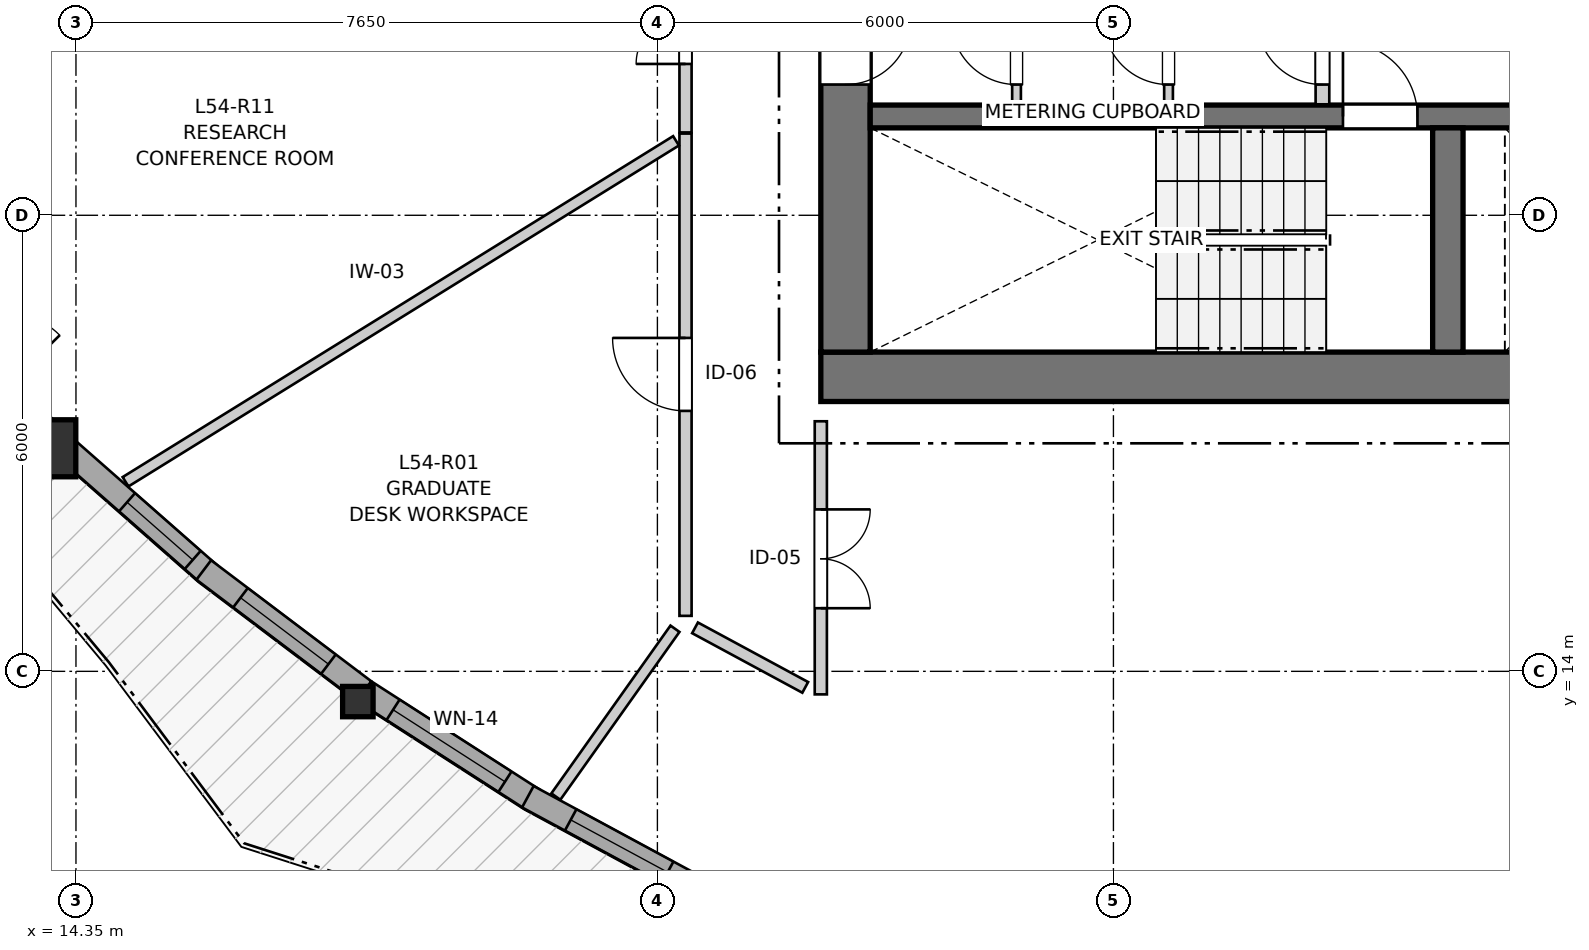
"""IFC4 building model, lengths in metres.
Left out: names, types, materials, properties, quantities, classifications, styles, units other than length and angle.
Written with IfcOpenShell. Run it as: python <this file> out.ifc"""

import sys

from ifc_helpers import new_model, si_unit, direction, frame, frame_2d, origin, origin_2d, place, context, subcontext, project, spatial, rectangle, i_section, extrude, source, transform, mapped, element, fill, save


model = new_model("IFC4")
c1 = context("Model", 3, precision=1e-05, world=origin(), true_north=direction((0.0, 1.0)))
c2 = subcontext(c1, "Body", "Model", "MODEL_VIEW")
j1 = project(units=[si_unit("LENGTHUNIT", "METRE"), si_unit("PLANEANGLEUNIT", "RADIAN")], contexts=[c1])
p1 = place(None, origin())
s1 = spatial("IfcSite", under=j1, at=p1, CompositionType="ELEMENT")
p2 = place(p1, origin())
s2 = spatial("IfcBuilding", under=s1, at=p2, CompositionType="ELEMENT")
p3 = place(p2, frame((0.0, 0.0, 181.0)))
s3 = spatial("IfcBuildingStorey", under=s2, at=p3, CompositionType="ELEMENT", Elevation=181.0)
p4 = place(p3, frame((24.15, 17.875, 0.0), z_axis=(0.0, 0.0, 1.0), x_axis=(1.0, 0.0, 0.0)))
e1 = element("IfcWall", 1, at=p4, inside=s3, PredefinedType="SHEAR", context=c2, shape_type="SweptSolid", body=[
    extrude(rectangle(XDim=12.4, YDim=0.65, at=frame_2d((6.2, 0.0))), origin(), (0.0, 0.0, 1.0), 2.95),
])
p5 = place(p3, frame((24.475, 33.8, 0.0), z_axis=(0.0, 0.0, 1.0), x_axis=(0.0, -1.0, 0.0)))
e2 = element("IfcWall", 2, at=p5, inside=s3, PredefinedType="SHEAR", context=c2, shape_type="SweptSolid", body=[
    extrude(rectangle(XDim=15.6, YDim=0.65, at=frame_2d((7.8, 0.0))), origin(), (0.0, 0.0, 1.0), 2.95),
])
p6 = place(p5, frame((7.05, 0.0, 0.0)))
e3 = element("IfcOpeningElement", 3, at=p6, cuts=e2, PredefinedType="OPENING", context=c2, shape_type="SweptSolid", body=[
    extrude(rectangle(XDim=1.5, YDim=2.15, at=frame_2d((0.75, 1.075))), frame((0.0, 0.335, 0.0), z_axis=(0.0, -1.0, 0.0), x_axis=(1.0, 0.0, 0.0)), (0.0, 0.0, 1.0), 0.67),
])
p7 = place(p5, frame((3.52, 0.0, 0.0)))
e4 = element("IfcOpeningElement", 4, at=p7, cuts=e2, PredefinedType="OPENING", context=c2, shape_type="SweptSolid", body=[
    extrude(rectangle(XDim=0.86, YDim=2.05, at=frame_2d((0.43, 1.025))), frame((0.0, 0.335, 0.0), z_axis=(0.0, -1.0, 0.0), x_axis=(1.0, 0.0, 0.0)), (0.0, 0.0, 1.0), 0.67),
])
p8 = place(p5, frame((11.22, 0.0, 0.0)))
e5 = element("IfcOpeningElement", 5, at=p8, cuts=e2, PredefinedType="OPENING", context=c2, shape_type="SweptSolid", body=[
    extrude(rectangle(XDim=0.86, YDim=2.05, at=frame_2d((0.43, 1.025))), frame((0.0, 0.335, 0.0), z_axis=(0.0, -1.0, 0.0), x_axis=(1.0, 0.0, 0.0)), (0.0, 0.0, 1.0), 0.67),
])
p9 = place(p3, frame((24.8, 21.3, 0.0), z_axis=(0.0, 0.0, 1.0), x_axis=(1.0, 0.0, 0.0)))
e6 = element("IfcWall", 6, at=p9, inside=s3, PredefinedType="SHEAR", context=c2, shape_type="SweptSolid", body=[
    extrude(rectangle(XDim=11.1, YDim=0.3, at=frame_2d((5.55, 0.0))), origin(), (0.0, 0.0, 1.0), 2.95),
])
p10 = place(p9, frame((6.22, 0.0, 0.0)))
e7 = element("IfcOpeningElement", 7, at=p10, cuts=e6, PredefinedType="OPENING", context=c2, shape_type="SweptSolid", body=[
    extrude(rectangle(XDim=0.98, YDim=2.15, at=frame_2d((0.49, 1.075))), frame((0.0, 0.16, 0.0), z_axis=(0.0, -1.0, 0.0), x_axis=(1.0, 0.0, 0.0)), (0.0, 0.0, 1.0), 0.32),
])
p11 = place(p9, frame((9.15, 0.0, 0.0)))
e8 = element("IfcOpeningElement", 8, at=p11, cuts=e6, PredefinedType="OPENING", context=c2, shape_type="SweptSolid", body=[
    extrude(rectangle(XDim=1.15, YDim=2.15, at=frame_2d((0.575, 1.075))), frame((0.0, 0.16, 0.0), z_axis=(0.0, -1.0, 0.0), x_axis=(1.0, 0.0, 0.0)), (0.0, 0.0, 1.0), 0.32),
])
p12 = place(p3, frame((32.4, 18.2, 0.0), z_axis=(0.0, 0.0, 1.0), x_axis=(0.0, 1.0, 0.0)))
e9 = element("IfcWall", 9, at=p12, inside=s3, PredefinedType="SHEAR", context=c2, shape_type="SweptSolid", body=[
    extrude(rectangle(XDim=2.95, YDim=0.4, at=frame_2d((1.475, 0.0))), origin(), (0.0, 0.0, 1.0), 2.95),
])
m1 = source(origin(), c2, "Body", "SweptSolid", [
    extrude(rectangle(XDim=0.75, YDim=0.75, at=origin_2d()), origin(), (0.0, 0.0, 1.0), 2.95),
])
p13 = place(p3, frame((13.973, 16.935, 0.0), z_axis=(0.0, 0.0, 1.0), x_axis=(1.0, 0.0, 0.0)))
e10 = element("IfcColumn", 10, at=p13, inside=s3, PredefinedType="COLUMN", context=c2, shape_type="MappedRepresentation", body=[
    mapped(m1, transform((0.0, 0.0, 0.0), x_axis=(1.0, 0.0, 0.0), y_axis=(0.0, 1.0, 0.0), z_axis=(0.0, 0.0, 1.0), scale=1.0)),
])
m2 = source(origin(), c2, "Body", "SweptSolid", [
    extrude(i_section(OverallWidth=0.401, OverallDepth=0.399, WebThickness=0.023, FlangeThickness=0.036, FilletRadius=0.015, at=origin_2d()), origin(), (0.0, 0.0, 1.0), 2.95),
])
p14 = place(p3, frame((18.059, 13.602, 0.0), z_axis=(0.0, 0.0, 1.0), x_axis=(1.0, 0.0, 0.0)))
e11 = element("IfcColumn", 11, at=p14, inside=s3, PredefinedType="PILASTER", context=c2, shape_type="MappedRepresentation", body=[
    mapped(m2, transform((0.0, 0.0, 0.0), x_axis=(1.0, 0.0, 0.0), y_axis=(0.0, 1.0, 0.0), z_axis=(0.0, 0.0, 1.0), scale=1.0)),
])
p15 = place(p3, frame((12.168, 18.996, 0.0), z_axis=(0.0, 0.0, 1.0), x_axis=(0.701479569818, -0.712689562943, 0.0)))
e12 = element("IfcWall", 12, at=p15, inside=s3, PredefinedType="SOLIDWALL", context=c2, shape_type="SweptSolid", body=[
    extrude(rectangle(XDim=2.57, YDim=0.32, at=frame_2d((1.285, 0.0))), origin(), (0.0, 0.0, 1.0), 2.53),
])
p16 = place(p15, frame((0.79, 0.0, 0.0)))
e13 = element("IfcOpeningElement", 13, at=p16, cuts=e12, PredefinedType="OPENING", context=c2, shape_type="SweptSolid", body=[
    extrude(rectangle(XDim=1.0, YDim=2.1, at=frame_2d((0.5, 1.05))), frame((0.0, 0.17, 0.0), z_axis=(0.0, -1.0, 0.0), x_axis=(1.0, 0.0, 0.0)), (0.0, 0.0, 1.0), 0.34),
])
p17 = place(p3, frame((14.202, 16.946, 0.0), z_axis=(0.0, 0.0, 1.0), x_axis=(0.751119873672, -0.660165839297, 0.0)))
e14 = element("IfcWall", 14, at=p17, inside=s3, PredefinedType="SOLIDWALL", context=c2, shape_type="SweptSolid", body=[
    extrude(rectangle(XDim=2.526, YDim=0.32, at=frame_2d((1.263, 0.0))), origin(), (0.0, 0.0, 1.0), 2.53),
])
p18 = place(p17, frame((1.092, 0.0, 0.82)))
e15 = element("IfcOpeningElement", 15, at=p18, cuts=e14, PredefinedType="OPENING", context=c2, shape_type="SweptSolid", body=[
    extrude(rectangle(XDim=1.15, YDim=1.2, at=frame_2d((0.575, 0.6))), frame((0.0, 0.17, 0.0), z_axis=(0.0, -1.0, 0.0), x_axis=(1.0, 0.0, 0.0)), (0.0, 0.0, 1.0), 0.34),
])
p19 = place(p3, frame((16.031, 15.334, 0.0), z_axis=(0.0, 0.0, 1.0), x_axis=(0.797976962718, -0.602687951573, 0.0)))
e16 = element("IfcWall", 16, at=p19, inside=s3, PredefinedType="SOLIDWALL", context=c2, shape_type="SweptSolid", body=[
    extrude(rectangle(XDim=2.642, YDim=0.32, at=frame_2d((1.321, 0.0))), origin(), (0.0, 0.0, 1.0), 2.53),
])
p20 = place(p19, frame((0.606, 0.0, 0.82)))
e17 = element("IfcOpeningElement", 17, at=p20, cuts=e16, PredefinedType="OPENING", context=c2, shape_type="SweptSolid", body=[
    extrude(rectangle(XDim=1.45, YDim=1.25, at=frame_2d((0.725, 0.625))), frame((0.0, 0.17, 0.0), z_axis=(0.0, -1.0, 0.0), x_axis=(1.0, 0.0, 0.0)), (0.0, 0.0, 1.0), 0.34),
])
p21 = place(p3, frame((18.162, 13.726, 0.0), z_axis=(0.0, 0.0, 1.0), x_axis=(0.841187536261, -0.540743496345, 0.0)))
e18 = element("IfcWall", 18, at=p21, inside=s3, PredefinedType="SOLIDWALL", context=c2, shape_type="SweptSolid", body=[
    extrude(rectangle(XDim=2.626, YDim=0.32, at=frame_2d((1.313, 0.0))), origin(), (0.0, 0.0, 1.0), 2.53),
])
p22 = place(p21, frame((0.428, 0.0, 0.82)))
e19 = element("IfcOpeningElement", 19, at=p22, cuts=e18, PredefinedType="OPENING", context=c2, shape_type="SweptSolid", body=[
    extrude(rectangle(XDim=1.75, YDim=1.3, at=frame_2d((0.875, 0.65))), frame((0.0, 0.17, 0.0), z_axis=(0.0, -1.0, 0.0), x_axis=(1.0, 0.0, 0.0)), (0.0, 0.0, 1.0), 0.34),
])
p23 = place(p3, frame((20.295, 12.351, 0.0), z_axis=(0.0, 0.0, 1.0), x_axis=(0.879809944858, -0.475325636726, 0.0)))
e20 = element("IfcWall", 20, at=p23, inside=s3, PredefinedType="SOLIDWALL", context=c2, shape_type="SweptSolid", body=[
    extrude(rectangle(XDim=2.481, YDim=0.32, at=frame_2d((1.241, 0.0))), origin(), (0.0, 0.0, 1.0), 2.53),
])
p24 = place(p23, frame((0.641, 0.0, 0.82)))
e21 = element("IfcOpeningElement", 21, at=p24, cuts=e20, PredefinedType="OPENING", context=c2, shape_type="SweptSolid", body=[
    extrude(rectangle(XDim=1.45, YDim=1.25, at=frame_2d((0.725, 0.625))), frame((0.0, 0.17, 0.0), z_axis=(0.0, -1.0, 0.0), x_axis=(1.0, 0.0, 0.0)), (0.0, 0.0, 1.0), 0.34),
])
p25 = place(p3, frame((30.75, 21.46, 0.0), z_axis=(0.0, 0.0, 1.0), x_axis=(0.0, 1.0, 0.0)))
e22 = element("IfcWall", 22, at=p25, inside=s3, PredefinedType="PARTITIONING", context=c2, shape_type="SweptSolid", body=[
    extrude(rectangle(XDim=3.11, YDim=0.18, at=frame_2d((1.555, 0.0))), origin(), (0.0, 0.0, 1.0), 2.95),
])
p26 = place(p25, frame((0.26, 0.0, 0.0)))
e23 = element("IfcOpeningElement", 23, at=p26, cuts=e22, PredefinedType="OPENING", context=c2, shape_type="SweptSolid", body=[
    extrude(rectangle(XDim=0.86, YDim=2.05, at=frame_2d((0.43, 1.025))), frame((0.0, 0.1, 0.0), z_axis=(0.0, -1.0, 0.0), x_axis=(1.0, 0.0, 0.0)), (0.0, 0.0, 1.0), 0.2),
])
p27 = place(p3, frame((26.725, 21.46, 0.0), z_axis=(0.0, 0.0, 1.0), x_axis=(0.0, 1.0, 0.0)))
e24 = element("IfcWall", 24, at=p27, inside=s3, PredefinedType="PARTITIONING", context=c2, shape_type="SweptSolid", body=[
    extrude(rectangle(XDim=1.38, YDim=0.115, at=frame_2d((0.69, 0.0))), origin(), (0.0, 0.0, 1.0), 2.95),
])
p28 = place(p27, frame((0.26, 0.0, 0.0)))
e25 = element("IfcOpeningElement", 25, at=p28, cuts=e24, PredefinedType="OPENING", context=c2, shape_type="SweptSolid", body=[
    extrude(rectangle(XDim=0.86, YDim=2.05, at=frame_2d((0.43, 1.025))), frame((0.0, 0.067, 0.0), z_axis=(0.0, -1.0, 0.0), x_axis=(1.0, 0.0, 0.0)), (0.0, 0.0, 1.0), 0.135),
])
p29 = place(p3, frame((28.725, 21.46, 0.0), z_axis=(0.0, 0.0, 1.0), x_axis=(0.0, 1.0, 0.0)))
e26 = element("IfcWall", 26, at=p29, inside=s3, PredefinedType="PARTITIONING", context=c2, shape_type="SweptSolid", body=[
    extrude(rectangle(XDim=1.38, YDim=0.115, at=frame_2d((0.69, 0.0))), origin(), (0.0, 0.0, 1.0), 2.95),
])
p30 = place(p29, frame((0.26, 0.0, 0.0)))
e27 = element("IfcOpeningElement", 27, at=p30, cuts=e26, PredefinedType="OPENING", context=c2, shape_type="SweptSolid", body=[
    extrude(rectangle(XDim=0.86, YDim=2.05, at=frame_2d((0.43, 1.025))), frame((0.0, 0.067, 0.0), z_axis=(0.0, -1.0, 0.0), x_axis=(1.0, 0.0, 0.0)), (0.0, 0.0, 1.0), 0.135),
])
p31 = place(p3, frame((22.37, 14.73, 0.0), z_axis=(0.0, 0.0, 1.0), x_axis=(0.0, 1.0, 0.0)))
e28 = element("IfcWall", 28, at=p31, inside=s3, PredefinedType="PARTITIONING", context=c2, shape_type="SweptSolid", body=[
    extrude(rectangle(XDim=6.345, YDim=0.16, at=frame_2d((3.172, 0.0))), origin(), (0.0, 0.0, 1.0), 2.95),
])
p32 = place(p31, frame((2.697, 0.0, 0.0)))
e29 = element("IfcOpeningElement", 29, at=p32, cuts=e28, PredefinedType="OPENING", context=c2, shape_type="SweptSolid", body=[
    extrude(rectangle(XDim=0.96, YDim=2.1, at=frame_2d((0.48, 1.05))), frame((0.0, 0.09, 0.0), z_axis=(0.0, -1.0, 0.0), x_axis=(1.0, 0.0, 0.0)), (0.0, 0.0, 1.0), 0.18),
])
p33 = place(p3, frame((24.15, 17.29, 0.0), z_axis=(0.0, 0.0, 1.0), x_axis=(0.0, -1.0, 0.0)))
e30 = element("IfcWall", 30, at=p33, inside=s3, PredefinedType="PARTITIONING", context=c2, shape_type="SweptSolid", body=[
    extrude(rectangle(XDim=3.593, YDim=0.16, at=frame_2d((1.796, 0.0))), origin(), (0.0, 0.0, 1.0), 2.95),
])
p34 = place(p33, frame((1.159, 0.0, 0.0)))
e31 = element("IfcOpeningElement", 31, at=p34, cuts=e30, PredefinedType="OPENING", context=c2, shape_type="SweptSolid", body=[
    extrude(rectangle(XDim=1.3, YDim=2.1, at=frame_2d((0.65, 1.05))), frame((0.0, 0.09, 0.0), z_axis=(0.0, -1.0, 0.0), x_axis=(1.0, 0.0, 0.0)), (0.0, 0.0, 1.0), 0.18),
])
p35 = place(p3, frame((22.37, 21.09, 0.0), z_axis=(0.0, 0.0, 1.0), x_axis=(0.0, 1.0, 0.0)))
e32 = element("IfcWall", 32, at=p35, inside=s3, PredefinedType="PARTITIONING", context=c2, shape_type="SweptSolid", body=[
    extrude(rectangle(XDim=3.06, YDim=0.16, at=frame_2d((1.53, 0.0))), origin(), (0.0, 0.0, 1.0), 2.95),
])
p36 = place(p35, frame((0.901, 0.0, 0.0)))
e33 = element("IfcOpeningElement", 33, at=p36, cuts=e32, PredefinedType="OPENING", context=c2, shape_type="SweptSolid", body=[
    extrude(rectangle(XDim=1.3, YDim=2.1, at=frame_2d((0.65, 1.05))), frame((0.0, 0.09, 0.0), z_axis=(0.0, -1.0, 0.0), x_axis=(1.0, 0.0, 0.0)), (0.0, 0.0, 1.0), 0.18),
])
p37 = place(p3, frame((15.002, 16.494, 0.0), z_axis=(0.0, 0.0, 1.0), x_axis=(0.850179022177, 0.5264937134, 0.0)))
e34 = element("IfcWall", 34, at=p37, inside=s3, PredefinedType="PARTITIONING", context=c2, shape_type="SweptSolid", body=[
    extrude(rectangle(XDim=8.519, YDim=0.145, at=frame_2d((4.26, 0.0))), origin(), (0.0, 0.0, 1.0), 2.95),
])
p38 = place(p3, frame((20.664, 12.352, 0.0), z_axis=(0.0, 0.0, 1.0), x_axis=(0.578847584957, 0.815435756752, 0.0)))
e35 = element("IfcWall", 35, at=p38, inside=s3, PredefinedType="PARTITIONING", context=c2, shape_type="SweptSolid", body=[
    extrude(rectangle(XDim=2.708, YDim=0.145, at=frame_2d((1.354, 0.0))), origin(), (0.0, 0.0, 1.0), 2.95),
])
p39 = place(p3, frame((22.495, 14.573, 0.0), z_axis=(0.0, 0.0, 1.0), x_axis=(0.879785217584, -0.475371403137, 0.0)))
e36 = element("IfcWall", 36, at=p39, inside=s3, PredefinedType="PARTITIONING", context=c2, shape_type="SweptSolid", body=[
    extrude(rectangle(XDim=1.648, YDim=0.16, at=frame_2d((0.824, 0.0))), origin(), (0.0, 0.0, 1.0), 2.95),
])
m3 = source(origin(), c2, "Body", "SweptSolid", [
    extrude(rectangle(XDim=1.15, YDim=1.2, at=frame_2d((0.575, 0.6))), frame((0.0, 0.03, 0.0), z_axis=(0.0, -1.0, 0.0), x_axis=(1.0, 0.0, 0.0)), (0.0, 0.0, 1.0), 0.06),
])
p40 = place(p18, origin())
e37 = element("IfcWindow", 37, at=p40, inside=s3, PartitioningType="SINGLE_PANEL", PredefinedType="WINDOW", context=c2, shape_type="MappedRepresentation", body=[
    mapped(m3, transform((0.0, 0.0, 0.0), x_axis=(1.0, 0.0, 0.0), y_axis=(0.0, 1.0, 0.0), z_axis=(0.0, 0.0, 1.0), scale=1.0)),
])
fill(e15, e37)
m4 = source(origin(), c2, "Body", "SweptSolid", [
    extrude(rectangle(XDim=1.45, YDim=1.25, at=frame_2d((0.725, 0.625))), frame((0.0, 0.03, 0.0), z_axis=(0.0, -1.0, 0.0), x_axis=(1.0, 0.0, 0.0)), (0.0, 0.0, 1.0), 0.06),
])
p41 = place(p20, origin())
e38 = element("IfcWindow", 38, at=p41, inside=s3, PartitioningType="SINGLE_PANEL", PredefinedType="WINDOW", context=c2, shape_type="MappedRepresentation", body=[
    mapped(m4, transform((0.0, 0.0, 0.0), x_axis=(1.0, 0.0, 0.0), y_axis=(0.0, 1.0, 0.0), z_axis=(0.0, 0.0, 1.0), scale=1.0)),
])
fill(e17, e38)
m5 = source(origin(), c2, "Body", "SweptSolid", [
    extrude(rectangle(XDim=1.75, YDim=1.3, at=frame_2d((0.875, 0.65))), frame((0.0, 0.03, 0.0), z_axis=(0.0, -1.0, 0.0), x_axis=(1.0, 0.0, 0.0)), (0.0, 0.0, 1.0), 0.06),
])
p42 = place(p22, origin())
e39 = element("IfcWindow", 39, at=p42, inside=s3, PartitioningType="SINGLE_PANEL", PredefinedType="WINDOW", context=c2, shape_type="MappedRepresentation", body=[
    mapped(m5, transform((0.0, 0.0, 0.0), x_axis=(1.0, 0.0, 0.0), y_axis=(0.0, 1.0, 0.0), z_axis=(0.0, 0.0, 1.0), scale=1.0)),
])
fill(e19, e39)
p43 = place(p24, origin())
e40 = element("IfcWindow", 40, at=p43, inside=s3, PartitioningType="SINGLE_PANEL", PredefinedType="WINDOW", context=c2, shape_type="MappedRepresentation", body=[
    mapped(m4, transform((0.0, 0.0, 0.0), x_axis=(1.0, 0.0, 0.0), y_axis=(0.0, 1.0, 0.0), z_axis=(0.0, 0.0, 1.0), scale=1.0)),
])
fill(e21, e40)
m6 = source(origin(), c2, "Body", "SweptSolid", [
    extrude(rectangle(XDim=0.98, YDim=2.15, at=frame_2d((0.49, 1.075))), frame((0.0, 0.025, 0.0), z_axis=(0.0, -1.0, 0.0), x_axis=(1.0, 0.0, 0.0)), (0.0, 0.0, 1.0), 0.05),
])
p44 = place(p10, origin())
e41 = element("IfcDoor", 41, at=p44, inside=s3, OperationType="SINGLE_SWING_LEFT", PredefinedType="DOOR", context=c2, shape_type="MappedRepresentation", body=[
    mapped(m6, transform((0.0, 0.0, 0.0), x_axis=(1.0, 0.0, 0.0), y_axis=(0.0, 1.0, 0.0), z_axis=(0.0, 0.0, 1.0), scale=1.0)),
])
fill(e7, e41)
m7 = source(origin(), c2, "Body", "SweptSolid", [
    extrude(rectangle(XDim=0.86, YDim=2.05, at=frame_2d((0.43, 1.025))), frame((0.0, 0.025, 0.0), z_axis=(0.0, -1.0, 0.0), x_axis=(1.0, 0.0, 0.0)), (0.0, 0.0, 1.0), 0.05),
])
p45 = place(p8, origin())
e42 = element("IfcDoor", 42, at=p45, inside=s3, OperationType="SINGLE_SWING_LEFT", PredefinedType="DOOR", context=c2, shape_type="MappedRepresentation", body=[
    mapped(m7, transform((0.0, 0.0, 0.0), x_axis=(1.0, 0.0, 0.0), y_axis=(0.0, 1.0, 0.0), z_axis=(0.0, 0.0, 1.0), scale=1.0)),
])
fill(e5, e42)
p46 = place(p26, origin())
e43 = element("IfcDoor", 43, at=p46, inside=s3, OperationType="SINGLE_SWING_RIGHT", PredefinedType="DOOR", context=c2, shape_type="MappedRepresentation", body=[
    mapped(m7, transform((0.0, 0.0, 0.0), x_axis=(1.0, 0.0, 0.0), y_axis=(0.0, 1.0, 0.0), z_axis=(0.0, 0.0, 1.0), scale=1.0)),
])
fill(e23, e43)
p47 = place(p28, origin())
e44 = element("IfcDoor", 44, at=p47, inside=s3, OperationType="SINGLE_SWING_RIGHT", PredefinedType="DOOR", context=c2, shape_type="MappedRepresentation", body=[
    mapped(m7, transform((0.0, 0.0, 0.0), x_axis=(1.0, 0.0, 0.0), y_axis=(0.0, 1.0, 0.0), z_axis=(0.0, 0.0, 1.0), scale=1.0)),
])
fill(e25, e44)
p48 = place(p30, origin())
e45 = element("IfcDoor", 45, at=p48, inside=s3, OperationType="SINGLE_SWING_RIGHT", PredefinedType="DOOR", context=c2, shape_type="MappedRepresentation", body=[
    mapped(m7, transform((0.0, 0.0, 0.0), x_axis=(1.0, 0.0, 0.0), y_axis=(0.0, 1.0, 0.0), z_axis=(0.0, 0.0, 1.0), scale=1.0)),
])
fill(e27, e45)
m8 = source(origin(), c2, "Body", "SweptSolid", [
    extrude(rectangle(XDim=0.96, YDim=2.1, at=frame_2d((0.48, 1.05))), frame((0.0, 0.025, 0.0), z_axis=(0.0, -1.0, 0.0), x_axis=(1.0, 0.0, 0.0)), (0.0, 0.0, 1.0), 0.05),
])
p49 = place(p32, origin())
e46 = element("IfcDoor", 46, at=p49, inside=s3, OperationType="SINGLE_SWING_RIGHT", PredefinedType="DOOR", context=c2, shape_type="MappedRepresentation", body=[
    mapped(m8, transform((0.0, 0.0, 0.0), x_axis=(1.0, 0.0, 0.0), y_axis=(0.0, 1.0, 0.0), z_axis=(0.0, 0.0, 1.0), scale=1.0)),
])
fill(e29, e46)
m9 = source(origin(), c2, "Body", "SweptSolid", [
    extrude(rectangle(XDim=1.3, YDim=2.1, at=frame_2d((0.65, 1.05))), frame((0.0, 0.025, 0.0), z_axis=(0.0, -1.0, 0.0), x_axis=(1.0, 0.0, 0.0)), (0.0, 0.0, 1.0), 0.05),
])
p50 = place(p34, origin())
e47 = element("IfcDoor", 47, at=p50, inside=s3, OperationType="DOUBLE_DOOR_SINGLE_SWING", PredefinedType="DOOR", context=c2, shape_type="MappedRepresentation", body=[
    mapped(m9, transform((0.0, 0.0, 0.0), x_axis=(1.0, 0.0, 0.0), y_axis=(0.0, 1.0, 0.0), z_axis=(0.0, 0.0, 1.0), scale=1.0)),
])
fill(e31, e47)
p51 = place(p36, origin())
e48 = element("IfcDoor", 48, at=p51, inside=s3, OperationType="DOUBLE_DOOR_SINGLE_SWING", PredefinedType="DOOR", context=c2, shape_type="MappedRepresentation", body=[
    mapped(m9, transform((0.0, 0.0, 0.0), x_axis=(1.0, 0.0, 0.0), y_axis=(0.0, 1.0, 0.0), z_axis=(0.0, 0.0, 1.0), scale=1.0)),
])
fill(e33, e48)
save(model, sys.argv[1])
